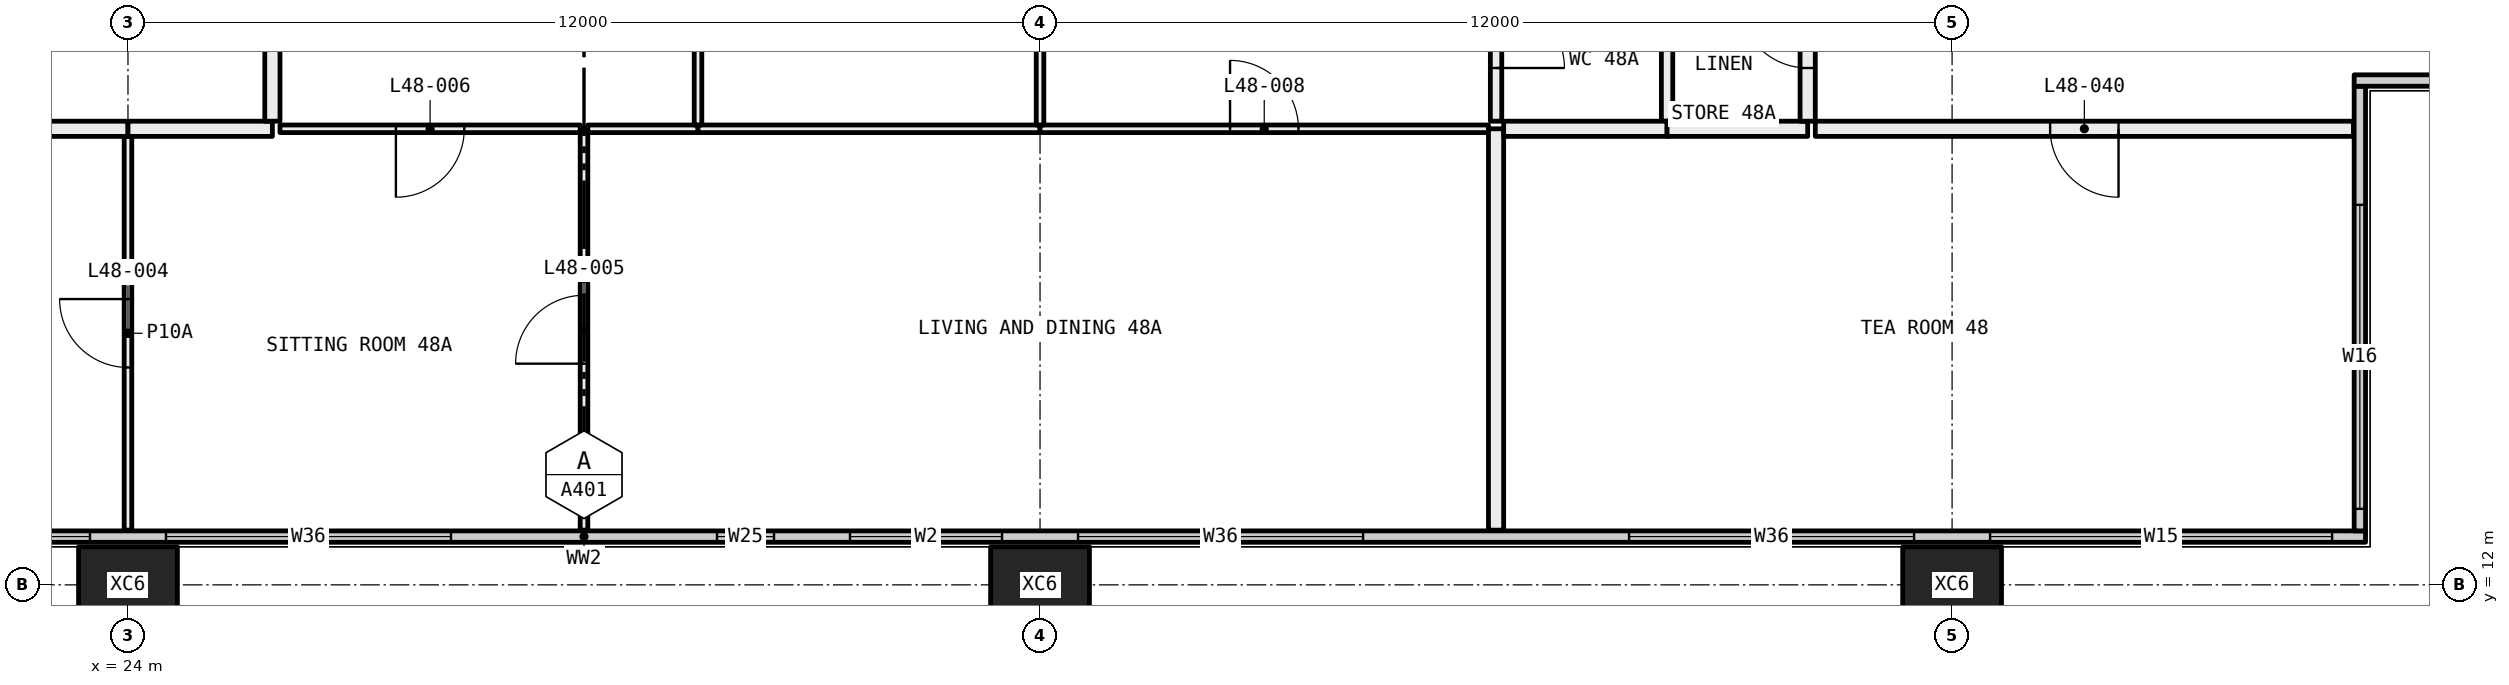
"""IFC4 building model, lengths in metres.
Left out: names, types, materials, properties, quantities, classifications, styles, units other than length and angle.
Written with IfcOpenShell. Run it as: python <this file> out.ifc"""

import sys

from ifc_helpers import new_model, si_unit, direction, frame, frame_2d, origin, origin_2d, place, context, subcontext, project, spatial, rectangle, hollow_rectangle, extrude, element, fill, save


model = new_model("IFC4")
c1 = context("Model", 3, precision=1e-05, world=origin(), true_north=direction((0.0, 1.0)))
c2 = subcontext(c1, "Body", "Model", "MODEL_VIEW")
j1 = project(units=[si_unit("LENGTHUNIT", "METRE"), si_unit("PLANEANGLEUNIT", "RADIAN")], contexts=[c1])
p1 = place(None, origin())
s1 = spatial("IfcSite", under=j1, at=p1, CompositionType="ELEMENT")
p2 = place(p1, origin())
s2 = spatial("IfcBuilding", under=s1, at=p2, CompositionType="ELEMENT")
p3 = place(p2, frame((0.0, 0.0, 182.4)))
s3 = spatial("IfcBuildingStorey", under=s2, at=p3, CompositionType="ELEMENT", Elevation=182.4)
for number, where, z_axis, x_axis in (
    (1, (24.0, 12.0, -0.4), (0.0, 0.0, 1.0), (1.0, 0.0, 0.0)),
    (2, (36.0, 12.0, -0.4), (0.0, 0.0, 1.0), (1.0, 0.0, 0.0)),
    (3, (48.0, 12.0, -0.4), (0.0, 0.0, 1.0), (1.0, 0.0, 0.0)),
):
    element("IfcColumn", number, at=place(p3, frame(where, z_axis=z_axis, x_axis=x_axis)), inside=s3, PredefinedType="COLUMN", context=c2, shape_type="SweptSolid", body=[
        extrude(hollow_rectangle(XDim=1.3, YDim=1.0, WallThickness=0.05, at=origin_2d()), origin(), (0.0, 0.0, 1.0), 3.45),
    ])
p4 = place(p3, frame((6.56, 12.635, 0.0), z_axis=(0.0, 0.0, 1.0), x_axis=(1.0, 0.0, 0.0)))
e4 = element("IfcWall", 4, at=p4, inside=s3, PredefinedType="ELEMENTEDWALL", context=c2, shape_type="SweptSolid", body=[
    extrude(rectangle(XDim=46.88, YDim=0.15, at=frame_2d((23.44, 0.0))), origin(), (0.0, 0.0, 1.0), 3.05),
])
p5 = place(p4, frame((0.44, 0.0, 0.45)))
e5 = element("IfcOpeningElement", 5, at=p5, cuts=e4, PredefinedType="OPENING", context=c2, shape_type="SweptSolid", body=[
    extrude(rectangle(XDim=4.5, YDim=2.55, at=frame_2d((2.25, 1.275))), frame((0.0, 0.085, 0.0), z_axis=(0.0, -1.0, 0.0), x_axis=(1.0, 0.0, 0.0)), (0.0, 0.0, 1.0), 0.17),
])
p6 = place(p4, frame((5.94, 0.0, 0.45)))
e6 = element("IfcOpeningElement", 6, at=p6, cuts=e4, PredefinedType="OPENING", context=c2, shape_type="SweptSolid", body=[
    extrude(rectangle(XDim=3.75, YDim=2.55, at=frame_2d((1.875, 1.275))), frame((0.0, 0.085, 0.0), z_axis=(0.0, -1.0, 0.0), x_axis=(1.0, 0.0, 0.0)), (0.0, 0.0, 1.0), 0.17),
])
p7 = place(p4, frame((13.19, 0.0, 0.45)))
e7 = element("IfcOpeningElement", 7, at=p7, cuts=e4, PredefinedType="OPENING", context=c2, shape_type="SweptSolid", body=[
    extrude(rectangle(XDim=3.75, YDim=2.55, at=frame_2d((1.875, 1.275))), frame((0.0, 0.085, 0.0), z_axis=(0.0, -1.0, 0.0), x_axis=(1.0, 0.0, 0.0)), (0.0, 0.0, 1.0), 0.17),
])
p8 = place(p4, frame((17.94, 0.0, 0.45)))
e8 = element("IfcOpeningElement", 8, at=p8, cuts=e4, PredefinedType="OPENING", context=c2, shape_type="SweptSolid", body=[
    extrude(rectangle(XDim=3.75, YDim=2.55, at=frame_2d((1.875, 1.275))), frame((0.0, 0.085, 0.0), z_axis=(0.0, -1.0, 0.0), x_axis=(1.0, 0.0, 0.0)), (0.0, 0.0, 1.0), 0.17),
])
p9 = place(p4, frame((25.19, 0.0, 0.45)))
e9 = element("IfcOpeningElement", 9, at=p9, cuts=e4, PredefinedType="OPENING", context=c2, shape_type="SweptSolid", body=[
    extrude(rectangle(XDim=0.75, YDim=2.55, at=frame_2d((0.375, 1.275))), frame((0.0, 0.085, 0.0), z_axis=(0.0, -1.0, 0.0), x_axis=(1.0, 0.0, 0.0)), (0.0, 0.0, 1.0), 0.17),
])
p10 = place(p4, frame((26.94, 0.0, 0.45)))
e10 = element("IfcOpeningElement", 10, at=p10, cuts=e4, PredefinedType="OPENING", context=c2, shape_type="SweptSolid", body=[
    extrude(rectangle(XDim=2.0, YDim=2.55, at=frame_2d((1.0, 1.275))), frame((0.0, 0.085, 0.0), z_axis=(0.0, -1.0, 0.0), x_axis=(1.0, 0.0, 0.0)), (0.0, 0.0, 1.0), 0.17),
])
p11 = place(p4, frame((29.94, 0.0, 0.45)))
e11 = element("IfcOpeningElement", 11, at=p11, cuts=e4, PredefinedType="OPENING", context=c2, shape_type="SweptSolid", body=[
    extrude(rectangle(XDim=3.75, YDim=2.55, at=frame_2d((1.875, 1.275))), frame((0.0, 0.085, 0.0), z_axis=(0.0, -1.0, 0.0), x_axis=(1.0, 0.0, 0.0)), (0.0, 0.0, 1.0), 0.17),
])
p12 = place(p4, frame((37.19, 0.0, 0.45)))
e12 = element("IfcOpeningElement", 12, at=p12, cuts=e4, PredefinedType="OPENING", context=c2, shape_type="SweptSolid", body=[
    extrude(rectangle(XDim=3.75, YDim=2.55, at=frame_2d((1.875, 1.275))), frame((0.0, 0.085, 0.0), z_axis=(0.0, -1.0, 0.0), x_axis=(1.0, 0.0, 0.0)), (0.0, 0.0, 1.0), 0.17),
])
p13 = place(p4, frame((41.94, 0.0, 0.45)))
e13 = element("IfcOpeningElement", 13, at=p13, cuts=e4, PredefinedType="OPENING", context=c2, shape_type="SweptSolid", body=[
    extrude(rectangle(XDim=4.5, YDim=2.55, at=frame_2d((2.25, 1.275))), frame((0.0, 0.085, 0.0), z_axis=(0.0, -1.0, 0.0), x_axis=(1.0, 0.0, 0.0)), (0.0, 0.0, 1.0), 0.17),
])
p14 = place(p3, frame((53.365, 12.71, 0.0), z_axis=(0.0, 0.0, 1.0), x_axis=(0.0, 1.0, 0.0)))
e14 = element("IfcWall", 14, at=p14, inside=s3, PredefinedType="ELEMENTEDWALL", context=c2, shape_type="SweptSolid", body=[
    extrude(rectangle(XDim=5.85, YDim=0.15, at=frame_2d((2.925, 0.0))), origin(), (0.0, 0.0, 1.0), 3.05),
])
p15 = place(p14, frame((0.29, 0.0, 0.45)))
e15 = element("IfcOpeningElement", 15, at=p15, cuts=e14, PredefinedType="OPENING", context=c2, shape_type="SweptSolid", body=[
    extrude(rectangle(XDim=4.0, YDim=2.55, at=frame_2d((2.0, 1.275))), frame((0.0, 0.085, 0.0), z_axis=(0.0, -1.0, 0.0), x_axis=(1.0, 0.0, 0.0)), (0.0, 0.0, 1.0), 0.17),
])
p16 = place(p3, frame((53.29, 18.635, 0.0), z_axis=(0.0, 0.0, 1.0), x_axis=(1.0, 0.0, 0.0)))
e16 = element("IfcWall", 16, at=p16, inside=s3, PredefinedType="ELEMENTEDWALL", context=c2, shape_type="SweptSolid", body=[
    extrude(rectangle(XDim=6.15, YDim=0.15, at=frame_2d((3.075, 0.0))), origin(), (0.0, 0.0, 1.0), 3.05),
])
p17 = place(p16, frame((1.71, 0.0, 0.45)))
e17 = element("IfcOpeningElement", 17, at=p17, cuts=e16, PredefinedType="OPENING", context=c2, shape_type="SweptSolid", body=[
    extrude(rectangle(XDim=4.0, YDim=2.55, at=frame_2d((2.0, 1.275))), frame((0.0, 0.085, 0.0), z_axis=(0.0, -1.0, 0.0), x_axis=(1.0, 0.0, 0.0)), (0.0, 0.0, 1.0), 0.17),
])
p18 = place(p3, frame((24.0, 12.72, 0.0), z_axis=(0.0, 0.0, 1.0), x_axis=(0.0, 1.0, 0.0)))
e18 = element("IfcWall", 18, at=p18, inside=s3, PredefinedType="PARTITIONING", context=c2, shape_type="SweptSolid", body=[
    extrude(rectangle(XDim=5.18, YDim=0.1, at=frame_2d((2.59, 0.0))), origin(), (0.0, 0.0, 1.0), 3.05),
])
p19 = place(p18, frame((2.14, 0.0, 0.0)))
e19 = element("IfcOpeningElement", 19, at=p19, cuts=e18, PredefinedType="OPENING", context=c2, shape_type="SweptSolid", body=[
    extrude(rectangle(XDim=0.9, YDim=2.1, at=frame_2d((0.45, 1.05))), frame((0.0, 0.06, 0.0), z_axis=(0.0, -1.0, 0.0), x_axis=(1.0, 0.0, 0.0)), (0.0, 0.0, 1.0), 0.12),
])
p20 = place(p3, frame((24.0, 18.0, 0.0), z_axis=(0.0, 0.0, 1.0), x_axis=(-1.0, 0.0, 0.0)))
e20 = element("IfcWall", 20, at=p20, inside=s3, PredefinedType="PARTITIONING", context=c2, shape_type="SweptSolid", body=[
    extrude(rectangle(XDim=6.0, YDim=0.2, at=frame_2d((3.0, 0.0))), origin(), (0.0, 0.0, 1.0), 3.05),
])
p21 = place(p3, frame((30.0, 12.72, 0.0), z_axis=(0.0, 0.0, 1.0), x_axis=(0.0, 1.0, 0.0)))
e21 = element("IfcWall", 21, at=p21, inside=s3, PredefinedType="PARTITIONING", context=c2, shape_type="SweptSolid", body=[
    extrude(rectangle(XDim=5.28, YDim=0.1, at=frame_2d((2.64, 0.0))), origin(), (0.0, 0.0, 1.0), 3.05),
])
p22 = place(p21, frame((2.19, 0.0, 0.0)))
e22 = element("IfcOpeningElement", 22, at=p22, cuts=e21, PredefinedType="OPENING", context=c2, shape_type="SweptSolid", body=[
    extrude(rectangle(XDim=0.9, YDim=2.1, at=frame_2d((0.45, 1.05))), frame((0.0, 0.06, 0.0), z_axis=(0.0, -1.0, 0.0), x_axis=(1.0, 0.0, 0.0)), (0.0, 0.0, 1.0), 0.12),
])
p23 = place(p3, frame((29.95, 18.0, 0.0), z_axis=(0.0, 0.0, 1.0), x_axis=(-1.0, 0.0, 0.0)))
e23 = element("IfcWall", 23, at=p23, inside=s3, PredefinedType="PARTITIONING", context=c2, shape_type="SweptSolid", body=[
    extrude(rectangle(XDim=3.95, YDim=0.1, at=frame_2d((1.975, 0.0))), origin(), (0.0, 0.0, 1.0), 3.05),
])
p24 = place(p23, frame((1.525, 0.0, 0.0)))
e24 = element("IfcOpeningElement", 24, at=p24, cuts=e23, PredefinedType="OPENING", context=c2, shape_type="SweptSolid", body=[
    extrude(rectangle(XDim=0.9, YDim=2.1, at=frame_2d((0.45, 1.05))), frame((0.0, 0.06, 0.0), z_axis=(0.0, -1.0, 0.0), x_axis=(1.0, 0.0, 0.0)), (0.0, 0.0, 1.0), 0.12),
])
p25 = place(p3, frame((25.9, 18.0, 0.0), z_axis=(0.0, 0.0, 1.0), x_axis=(-1.0, 0.0, 0.0)))
e25 = element("IfcWall", 25, at=p25, inside=s3, PredefinedType="PARTITIONING", context=c2, shape_type="SweptSolid", body=[
    extrude(rectangle(XDim=1.9, YDim=0.2, at=frame_2d((0.95, 0.0))), origin(), (0.0, 0.0, 1.0), 3.05),
])
p26 = place(p3, frame((31.5, 18.0, 0.0), z_axis=(0.0, 0.0, 1.0), x_axis=(-1.0, 0.0, 0.0)))
e26 = element("IfcWall", 26, at=p26, inside=s3, PredefinedType="PARTITIONING", context=c2, shape_type="SweptSolid", body=[
    extrude(rectangle(XDim=1.45, YDim=0.1, at=frame_2d((0.725, 0.0))), origin(), (0.0, 0.0, 1.0), 3.05),
])
p27 = place(p3, frame((36.0, 18.0, 0.0), z_axis=(0.0, 0.0, 1.0), x_axis=(-1.0, 0.0, 0.0)))
e27 = element("IfcWall", 27, at=p27, inside=s3, PredefinedType="PARTITIONING", context=c2, shape_type="SweptSolid", body=[
    extrude(rectangle(XDim=4.5, YDim=0.1, at=frame_2d((2.25, 0.0))), origin(), (0.0, 0.0, 1.0), 2.45),
])
p28 = place(p3, frame((41.9, 18.0, 0.0), z_axis=(0.0, 0.0, 1.0), x_axis=(-1.0, 0.0, 0.0)))
e28 = element("IfcWall", 28, at=p28, inside=s3, PredefinedType="PARTITIONING", context=c2, shape_type="SweptSolid", body=[
    extrude(rectangle(XDim=5.9, YDim=0.1, at=frame_2d((2.95, 0.0))), origin(), (0.0, 0.0, 1.0), 2.45),
])
p29 = place(p28, frame((2.5, 0.0, 0.0)))
e29 = element("IfcOpeningElement", 29, at=p29, cuts=e28, PredefinedType="OPENING", context=c2, shape_type="SweptSolid", body=[
    extrude(rectangle(XDim=0.9, YDim=2.1, at=frame_2d((0.45, 1.05))), frame((0.0, 0.06, 0.0), z_axis=(0.0, -1.0, 0.0), x_axis=(1.0, 0.0, 0.0)), (0.0, 0.0, 1.0), 0.12),
])
p30 = place(p3, frame((42.0, 12.72, 0.0), z_axis=(0.0, 0.0, 1.0), x_axis=(0.0, 1.0, 0.0)))
e30 = element("IfcWall", 30, at=p30, inside=s3, PredefinedType="PARTITIONING", context=c2, shape_type="SweptSolid", body=[
    extrude(rectangle(XDim=5.28, YDim=0.2, at=frame_2d((2.64, 0.0))), origin(), (0.0, 0.0, 1.0), 3.05),
])
p31 = place(p3, frame((31.5, 18.05, 0.0), z_axis=(0.0, 0.0, 1.0), x_axis=(0.0, 1.0, 0.0)))
e31 = element("IfcWall", 31, at=p31, inside=s3, PredefinedType="PARTITIONING", context=c2, shape_type="SweptSolid", body=[
    extrude(rectangle(XDim=6.25, YDim=0.1, at=frame_2d((3.125, 0.0))), origin(), (0.0, 0.0, 1.0), 2.45),
])
p32 = place(p31, frame((2.675, 0.0, 0.0)))
e32 = element("IfcOpeningElement", 32, at=p32, cuts=e31, PredefinedType="OPENING", context=c2, shape_type="SweptSolid", body=[
    extrude(rectangle(XDim=0.9, YDim=2.1, at=frame_2d((0.45, 1.05))), frame((0.0, 0.06, 0.0), z_axis=(0.0, -1.0, 0.0), x_axis=(1.0, 0.0, 0.0)), (0.0, 0.0, 1.0), 0.12),
])
p33 = place(p3, frame((25.9, 23.9, 0.0), z_axis=(0.0, 0.0, 1.0), x_axis=(0.0, -1.0, 0.0)))
e33 = element("IfcWall", 33, at=p33, inside=s3, PredefinedType="PARTITIONING", context=c2, shape_type="SweptSolid", body=[
    extrude(rectangle(XDim=5.8, YDim=0.2, at=frame_2d((2.9, 0.0))), origin(), (0.0, 0.0, 1.0), 3.05),
])
p34 = place(p3, frame((36.0, 18.05, 0.0), z_axis=(0.0, 0.0, 1.0), x_axis=(0.0, 1.0, 0.0)))
e34 = element("IfcWall", 34, at=p34, inside=s3, PredefinedType="PARTITIONING", context=c2, shape_type="SweptSolid", body=[
    extrude(rectangle(XDim=5.3, YDim=0.1, at=frame_2d((2.65, 0.0))), origin(), (0.0, 0.0, 1.0), 2.45),
])
p35 = place(p3, frame((42.0, 18.1, 0.0), z_axis=(0.0, 0.0, 1.0), x_axis=(0.0, 1.0, 0.0)))
e35 = element("IfcWall", 35, at=p35, inside=s3, PredefinedType="PARTITIONING", context=c2, shape_type="SweptSolid", body=[
    extrude(rectangle(XDim=2.3, YDim=0.15, at=frame_2d((1.15, 0.0))), origin(), (0.0, 0.0, 1.0), 3.05),
])
p36 = place(p35, frame((0.7, 0.0, 0.0)))
e36 = element("IfcOpeningElement", 36, at=p36, cuts=e35, PredefinedType="OPENING", context=c2, shape_type="SweptSolid", body=[
    extrude(rectangle(XDim=0.9, YDim=2.1, at=frame_2d((0.45, 1.05))), frame((0.0, 0.085, 0.0), z_axis=(0.0, -1.0, 0.0), x_axis=(1.0, 0.0, 0.0)), (0.0, 0.0, 1.0), 0.17),
])
p37 = place(p3, frame((44.25, 18.1, 0.0), z_axis=(0.0, 0.0, 1.0), x_axis=(0.0, 1.0, 0.0)))
e37 = element("IfcWall", 37, at=p37, inside=s3, PredefinedType="PARTITIONING", context=c2, shape_type="SweptSolid", body=[
    extrude(rectangle(XDim=2.3, YDim=0.15, at=frame_2d((1.15, 0.0))), origin(), (0.0, 0.0, 1.0), 3.05),
])
p38 = place(p3, frame((42.1, 18.0, 0.0), z_axis=(0.0, 0.0, 1.0), x_axis=(1.0, 0.0, 0.0)))
e38 = element("IfcWall", 38, at=p38, inside=s3, PredefinedType="PARTITIONING", context=c2, shape_type="SweptSolid", body=[
    extrude(rectangle(XDim=2.15, YDim=0.2, at=frame_2d((1.075, 0.0))), origin(), (0.0, 0.0, 1.0), 3.05),
])
p39 = place(p3, frame((44.25, 18.0, 0.0), z_axis=(0.0, 0.0, 1.0), x_axis=(1.0, 0.0, 0.0)))
e39 = element("IfcWall", 39, at=p39, inside=s3, PredefinedType="PARTITIONING", context=c2, shape_type="SweptSolid", body=[
    extrude(rectangle(XDim=1.85, YDim=0.2, at=frame_2d((0.925, 0.0))), origin(), (0.0, 0.0, 1.0), 3.05),
])
p40 = place(p3, frame((46.1, 18.1, 0.0), z_axis=(0.0, 0.0, 1.0), x_axis=(0.0, 1.0, 0.0)))
e40 = element("IfcWall", 40, at=p40, inside=s3, PredefinedType="PARTITIONING", context=c2, shape_type="SweptSolid", body=[
    extrude(rectangle(XDim=2.3, YDim=0.2, at=frame_2d((1.15, 0.0))), origin(), (0.0, 0.0, 1.0), 3.05),
])
p41 = place(p40, frame((0.7, 0.0, 0.0)))
e41 = element("IfcOpeningElement", 41, at=p41, cuts=e40, PredefinedType="OPENING", context=c2, shape_type="SweptSolid", body=[
    extrude(rectangle(XDim=0.9, YDim=2.1, at=frame_2d((0.45, 1.05))), frame((0.0, 0.11, 0.0), z_axis=(0.0, -1.0, 0.0), x_axis=(1.0, 0.0, 0.0)), (0.0, 0.0, 1.0), 0.22),
])
p42 = place(p3, frame((53.28, 18.0, 0.0), z_axis=(0.0, 0.0, 1.0), x_axis=(-1.0, 0.0, 0.0)))
e42 = element("IfcWall", 42, at=p42, inside=s3, PredefinedType="PARTITIONING", context=c2, shape_type="SweptSolid", body=[
    extrude(rectangle(XDim=7.08, YDim=0.2, at=frame_2d((3.54, 0.0))), origin(), (0.0, 0.0, 1.0), 3.05),
])
p43 = place(p42, frame((3.09, 0.0, 0.0)))
e43 = element("IfcOpeningElement", 43, at=p43, cuts=e42, PredefinedType="OPENING", context=c2, shape_type="SweptSolid", body=[
    extrude(rectangle(XDim=0.9, YDim=2.1, at=frame_2d((0.45, 1.05))), frame((0.0, 0.11, 0.0), z_axis=(0.0, -1.0, 0.0), x_axis=(1.0, 0.0, 0.0)), (0.0, 0.0, 1.0), 0.22),
])
p44 = place(p7, origin())
e44 = element("IfcWindow", 44, at=p44, inside=s3, PartitioningType="SINGLE_PANEL", PredefinedType="WINDOW", context=c2, shape_type="SweptSolid", body=[
    extrude(rectangle(XDim=3.75, YDim=2.55, at=frame_2d((1.875, 1.275))), frame((0.0, 0.03, 0.0), z_axis=(0.0, -1.0, 0.0), x_axis=(1.0, 0.0, 0.0)), (0.0, 0.0, 1.0), 0.06),
])
fill(e7, e44)
p45 = place(p8, origin())
e45 = element("IfcWindow", 45, at=p45, inside=s3, PartitioningType="SINGLE_PANEL", PredefinedType="WINDOW", context=c2, shape_type="SweptSolid", body=[
    extrude(rectangle(XDim=3.75, YDim=2.55, at=frame_2d((1.875, 1.275))), frame((0.0, 0.03, 0.0), z_axis=(0.0, -1.0, 0.0), x_axis=(1.0, 0.0, 0.0)), (0.0, 0.0, 1.0), 0.06),
])
fill(e8, e45)
p46 = place(p9, origin())
e46 = element("IfcWindow", 46, at=p46, inside=s3, PartitioningType="SINGLE_PANEL", PredefinedType="WINDOW", context=c2, shape_type="SweptSolid", body=[
    extrude(rectangle(XDim=0.75, YDim=2.55, at=frame_2d((0.375, 1.275))), frame((0.0, 0.03, 0.0), z_axis=(0.0, -1.0, 0.0), x_axis=(1.0, 0.0, 0.0)), (0.0, 0.0, 1.0), 0.06),
])
fill(e9, e46)
p47 = place(p10, origin())
e47 = element("IfcWindow", 47, at=p47, inside=s3, PartitioningType="SINGLE_PANEL", PredefinedType="WINDOW", context=c2, shape_type="SweptSolid", body=[
    extrude(rectangle(XDim=2.0, YDim=2.55, at=frame_2d((1.0, 1.275))), frame((0.0, 0.03, 0.0), z_axis=(0.0, -1.0, 0.0), x_axis=(1.0, 0.0, 0.0)), (0.0, 0.0, 1.0), 0.06),
])
fill(e10, e47)
p48 = place(p11, origin())
e48 = element("IfcWindow", 48, at=p48, inside=s3, PartitioningType="SINGLE_PANEL", PredefinedType="WINDOW", context=c2, shape_type="SweptSolid", body=[
    extrude(rectangle(XDim=3.75, YDim=2.55, at=frame_2d((1.875, 1.275))), frame((0.0, 0.03, 0.0), z_axis=(0.0, -1.0, 0.0), x_axis=(1.0, 0.0, 0.0)), (0.0, 0.0, 1.0), 0.06),
])
fill(e11, e48)
p49 = place(p12, origin())
e49 = element("IfcWindow", 49, at=p49, inside=s3, PartitioningType="SINGLE_PANEL", PredefinedType="WINDOW", context=c2, shape_type="SweptSolid", body=[
    extrude(rectangle(XDim=3.75, YDim=2.55, at=frame_2d((1.875, 1.275))), frame((0.0, 0.03, 0.0), z_axis=(0.0, -1.0, 0.0), x_axis=(1.0, 0.0, 0.0)), (0.0, 0.0, 1.0), 0.06),
])
fill(e12, e49)
p50 = place(p13, origin())
e50 = element("IfcWindow", 50, at=p50, inside=s3, PartitioningType="SINGLE_PANEL", PredefinedType="WINDOW", context=c2, shape_type="SweptSolid", body=[
    extrude(rectangle(XDim=4.5, YDim=2.55, at=frame_2d((2.25, 1.275))), frame((0.0, 0.03, 0.0), z_axis=(0.0, -1.0, 0.0), x_axis=(1.0, 0.0, 0.0)), (0.0, 0.0, 1.0), 0.06),
])
fill(e13, e50)
p51 = place(p15, origin())
e51 = element("IfcWindow", 51, at=p51, inside=s3, PartitioningType="SINGLE_PANEL", PredefinedType="WINDOW", context=c2, shape_type="SweptSolid", body=[
    extrude(rectangle(XDim=4.0, YDim=2.55, at=frame_2d((2.0, 1.275))), frame((0.0, 0.03, 0.0), z_axis=(0.0, -1.0, 0.0), x_axis=(1.0, 0.0, 0.0)), (0.0, 0.0, 1.0), 0.06),
])
fill(e15, e51)
p52 = place(p19, origin())
e52 = element("IfcDoor", 52, at=p52, inside=s3, OperationType="SINGLE_SWING_LEFT", PredefinedType="DOOR", context=c2, shape_type="SweptSolid", body=[
    extrude(rectangle(XDim=0.9, YDim=2.1, at=frame_2d((0.45, 1.05))), frame((0.0, 0.025, 0.0), z_axis=(0.0, -1.0, 0.0), x_axis=(1.0, 0.0, 0.0)), (0.0, 0.0, 1.0), 0.05),
])
fill(e19, e52)
p53 = place(p22, origin())
e53 = element("IfcDoor", 53, at=p53, inside=s3, OperationType="SINGLE_SWING_RIGHT", PredefinedType="DOOR", context=c2, shape_type="SweptSolid", body=[
    extrude(rectangle(XDim=0.9, YDim=2.1, at=frame_2d((0.45, 1.05))), frame((0.0, 0.025, 0.0), z_axis=(0.0, -1.0, 0.0), x_axis=(1.0, 0.0, 0.0)), (0.0, 0.0, 1.0), 0.05),
])
fill(e22, e53)
p54 = place(p24, origin())
e54 = element("IfcDoor", 54, at=p54, inside=s3, OperationType="SINGLE_SWING_LEFT", PredefinedType="DOOR", context=c2, shape_type="SweptSolid", body=[
    extrude(rectangle(XDim=0.9, YDim=2.1, at=frame_2d((0.45, 1.05))), frame((0.0, 0.025, 0.0), z_axis=(0.0, -1.0, 0.0), x_axis=(1.0, 0.0, 0.0)), (0.0, 0.0, 1.0), 0.05),
])
fill(e24, e54)
p55 = place(p29, frame((0.9, 0.0, 0.0), x_axis=(-1.0, 0.0, 0.0)))
e55 = element("IfcDoor", 55, at=p55, inside=s3, OperationType="SINGLE_SWING_RIGHT", PredefinedType="DOOR", context=c2, shape_type="SweptSolid", body=[
    extrude(rectangle(XDim=0.9, YDim=2.1, at=frame_2d((0.45, 1.05))), frame((0.0, 0.025, 0.0), z_axis=(0.0, -1.0, 0.0), x_axis=(1.0, 0.0, 0.0)), (0.0, 0.0, 1.0), 0.05),
])
fill(e29, e55)
p56 = place(p36, frame((0.9, 0.0, 0.0), x_axis=(-1.0, 0.0, 0.0)))
e56 = element("IfcDoor", 56, at=p56, inside=s3, OperationType="SINGLE_SWING_LEFT", PredefinedType="DOOR", context=c2, shape_type="SweptSolid", body=[
    extrude(rectangle(XDim=0.9, YDim=2.1, at=frame_2d((0.45, 1.05))), frame((0.0, 0.025, 0.0), z_axis=(0.0, -1.0, 0.0), x_axis=(1.0, 0.0, 0.0)), (0.0, 0.0, 1.0), 0.05),
])
fill(e36, e56)
p57 = place(p41, origin())
e57 = element("IfcDoor", 57, at=p57, inside=s3, OperationType="SINGLE_SWING_LEFT", PredefinedType="DOOR", context=c2, shape_type="SweptSolid", body=[
    extrude(rectangle(XDim=0.9, YDim=2.1, at=frame_2d((0.45, 1.05))), frame((0.0, 0.025, 0.0), z_axis=(0.0, -1.0, 0.0), x_axis=(1.0, 0.0, 0.0)), (0.0, 0.0, 1.0), 0.05),
])
fill(e41, e57)
p58 = place(p43, origin())
e58 = element("IfcDoor", 58, at=p58, inside=s3, OperationType="SINGLE_SWING_RIGHT", PredefinedType="DOOR", context=c2, shape_type="SweptSolid", body=[
    extrude(rectangle(XDim=0.9, YDim=2.1, at=frame_2d((0.45, 1.05))), frame((0.0, 0.025, 0.0), z_axis=(0.0, -1.0, 0.0), x_axis=(1.0, 0.0, 0.0)), (0.0, 0.0, 1.0), 0.05),
])
fill(e43, e58)
save(model, sys.argv[1])
